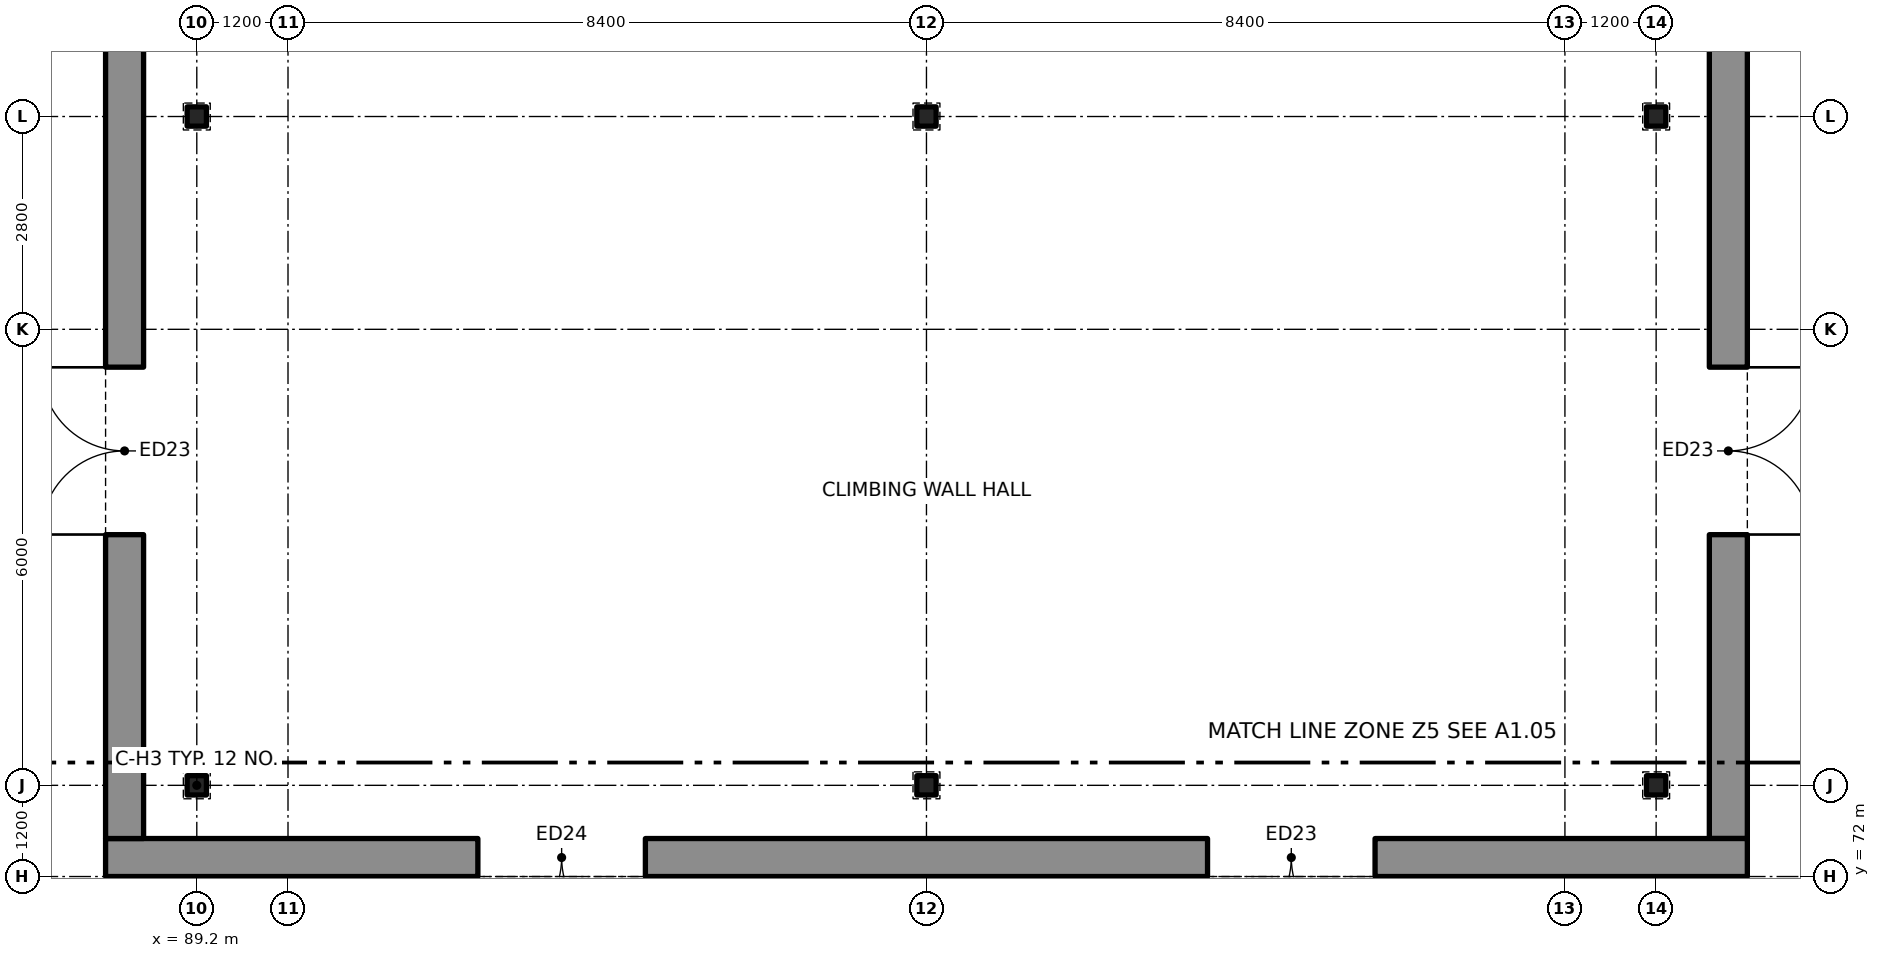
"""IFC4 building model, lengths in metres.
Left out: names, types, materials, properties, quantities, classifications, styles, units other than length and angle.
Written with IfcOpenShell. Run it as: python <this file> out.ifc"""

import sys

from ifc_helpers import new_model, si_unit, direction, frame, frame_2d, origin, origin_2d, place, context, subcontext, project, spatial, rectangle, hollow_rectangle, extrude, element, fill, save


model = new_model("IFC4")
c1 = context("Model", 3, precision=1e-05, world=origin(), true_north=direction((0.0, 1.0)))
c2 = subcontext(c1, "Body", "Model", "MODEL_VIEW")
j1 = project(units=[si_unit("LENGTHUNIT", "METRE"), si_unit("PLANEANGLEUNIT", "RADIAN")], contexts=[c1])
p1 = place(None, origin())
s1 = spatial("IfcSite", under=j1, at=p1, CompositionType="ELEMENT")
p2 = place(p1, origin())
s2 = spatial("IfcBuilding", under=s1, at=p2, CompositionType="ELEMENT")
p3 = place(p2, origin())
s3 = spatial("IfcBuildingStorey", under=s2, at=p3, CompositionType="ELEMENT", Elevation=0.0)
for number, where, z_axis, x_axis in (
    (1, (89.2, 73.2, -0.5), (0.0, 0.0, 1.0), (1.0, 0.0, 0.0)),
    (2, (89.2, 82.0, -0.5), (0.0, 0.0, 1.0), (1.0, 0.0, 0.0)),
    (3, (98.8, 73.2, -0.5), (0.0, 0.0, 1.0), (1.0, 0.0, 0.0)),
    (4, (98.8, 82.0, -0.5), (0.0, 0.0, 1.0), (1.0, 0.0, 0.0)),
    (5, (108.4, 73.2, -0.5), (0.0, 0.0, 1.0), (1.0, 0.0, 0.0)),
    (6, (108.4, 82.0, -0.5), (0.0, 0.0, 1.0), (1.0, 0.0, 0.0)),
):
    element("IfcColumn", number, at=place(p3, frame(where, z_axis=z_axis, x_axis=x_axis)), inside=s3, PredefinedType="COLUMN", context=c2, shape_type="SweptSolid", body=[
        extrude(hollow_rectangle(XDim=0.254, YDim=0.254, WallThickness=0.013, at=origin_2d()), origin(), (0.0, 0.0, 1.0), 4.9),
    ])
p4 = place(p3, frame((88.25, 72.5, 0.0), z_axis=(0.0, 0.0, 1.0), x_axis=(0.0, 1.0, 0.0)))
e7 = element("IfcWall", 7, at=p4, inside=s3, PredefinedType="SOLIDWALL", context=c2, shape_type="SweptSolid", body=[
    extrude(rectangle(XDim=27.95, YDim=0.5, at=frame_2d((13.975, 0.0))), origin(), (0.0, 0.0, 1.0), 4.4),
])
p5 = place(p4, frame((4.0, 0.0, 0.0)))
e8 = element("IfcOpeningElement", 8, at=p5, cuts=e7, PredefinedType="OPENING", context=c2, shape_type="SweptSolid", body=[
    extrude(rectangle(XDim=2.2, YDim=2.4, at=frame_2d((1.1, 1.2))), frame((0.0, 0.26, 0.0), z_axis=(0.0, -1.0, 0.0), x_axis=(1.0, 0.0, 0.0)), (0.0, 0.0, 1.0), 0.52),
])
p6 = place(p4, frame((23.9, 0.0, 0.0)))
e9 = element("IfcOpeningElement", 9, at=p6, cuts=e7, PredefinedType="OPENING", context=c2, shape_type="SweptSolid", body=[
    extrude(rectangle(XDim=1.2, YDim=2.4, at=frame_2d((0.6, 1.2))), frame((0.0, 0.26, 0.0), z_axis=(0.0, -1.0, 0.0), x_axis=(1.0, 0.0, 0.0)), (0.0, 0.0, 1.0), 0.52),
])
p7 = place(p3, frame((109.35, 72.5, 0.0), z_axis=(0.0, 0.0, 1.0), x_axis=(0.0, 1.0, 0.0)))
e10 = element("IfcWall", 10, at=p7, inside=s3, PredefinedType="SOLIDWALL", context=c2, shape_type="SweptSolid", body=[
    extrude(rectangle(XDim=27.95, YDim=0.5, at=frame_2d((13.975, 0.0))), origin(), (0.0, 0.0, 1.0), 4.4),
])
p8 = place(p7, frame((4.0, 0.0, 0.0)))
e11 = element("IfcOpeningElement", 11, at=p8, cuts=e10, PredefinedType="OPENING", context=c2, shape_type="SweptSolid", body=[
    extrude(rectangle(XDim=2.2, YDim=2.4, at=frame_2d((1.1, 1.2))), frame((0.0, 0.26, 0.0), z_axis=(0.0, -1.0, 0.0), x_axis=(1.0, 0.0, 0.0)), (0.0, 0.0, 1.0), 0.52),
])
p9 = place(p7, frame((23.9, 0.0, 0.0)))
e12 = element("IfcOpeningElement", 12, at=p9, cuts=e10, PredefinedType="OPENING", context=c2, shape_type="SweptSolid", body=[
    extrude(rectangle(XDim=1.2, YDim=2.4, at=frame_2d((0.6, 1.2))), frame((0.0, 0.26, 0.0), z_axis=(0.0, -1.0, 0.0), x_axis=(1.0, 0.0, 0.0)), (0.0, 0.0, 1.0), 0.52),
])
p10 = place(p3, frame((88.0, 72.25, 0.0), z_axis=(0.0, 0.0, 1.0), x_axis=(1.0, 0.0, 0.0)))
e13 = element("IfcWall", 13, at=p10, inside=s3, PredefinedType="SOLIDWALL", context=c2, shape_type="SweptSolid", body=[
    extrude(rectangle(XDim=21.6, YDim=0.5, at=frame_2d((10.8, 0.0))), origin(), (0.0, 0.0, 1.0), 4.4),
])
p11 = place(p10, frame((4.9, 0.0, 0.0)))
e14 = element("IfcOpeningElement", 14, at=p11, cuts=e13, PredefinedType="OPENING", context=c2, shape_type="SweptSolid", body=[
    extrude(rectangle(XDim=2.2, YDim=2.7, at=frame_2d((1.1, 1.35))), frame((0.0, 0.26, 0.0), z_axis=(0.0, -1.0, 0.0), x_axis=(1.0, 0.0, 0.0)), (0.0, 0.0, 1.0), 0.52),
])
p12 = place(p10, frame((14.5, 0.0, 0.0)))
e15 = element("IfcOpeningElement", 15, at=p12, cuts=e13, PredefinedType="OPENING", context=c2, shape_type="SweptSolid", body=[
    extrude(rectangle(XDim=2.2, YDim=2.4, at=frame_2d((1.1, 1.2))), frame((0.0, 0.26, 0.0), z_axis=(0.0, -1.0, 0.0), x_axis=(1.0, 0.0, 0.0)), (0.0, 0.0, 1.0), 0.52),
])
p13 = place(p5, origin())
e16 = element("IfcDoor", 16, at=p13, inside=s3, OperationType="DOUBLE_DOOR_SINGLE_SWING", PredefinedType="DOOR", context=c2, shape_type="SweptSolid", body=[
    extrude(rectangle(XDim=2.2, YDim=2.4, at=frame_2d((1.1, 1.2))), frame((0.0, 0.025, 0.0), z_axis=(0.0, -1.0, 0.0), x_axis=(1.0, 0.0, 0.0)), (0.0, 0.0, 1.0), 0.05),
])
fill(e8, e16)
p14 = place(p8, origin())
e17 = element("IfcDoor", 17, at=p14, inside=s3, OperationType="DOUBLE_DOOR_SINGLE_SWING", PredefinedType="DOOR", context=c2, shape_type="SweptSolid", body=[
    extrude(rectangle(XDim=2.2, YDim=2.4, at=frame_2d((1.1, 1.2))), frame((0.0, 0.025, 0.0), z_axis=(0.0, -1.0, 0.0), x_axis=(1.0, 0.0, 0.0)), (0.0, 0.0, 1.0), 0.05),
])
fill(e11, e17)
p15 = place(p11, origin())
e18 = element("IfcDoor", 18, at=p15, inside=s3, OperationType="DOUBLE_DOOR_SINGLE_SWING", PredefinedType="DOOR", context=c2, shape_type="SweptSolid", body=[
    extrude(rectangle(XDim=2.2, YDim=2.7, at=frame_2d((1.1, 1.35))), frame((0.0, 0.025, 0.0), z_axis=(0.0, -1.0, 0.0), x_axis=(1.0, 0.0, 0.0)), (0.0, 0.0, 1.0), 0.05),
])
fill(e14, e18)
p16 = place(p12, origin())
e19 = element("IfcDoor", 19, at=p16, inside=s3, OperationType="DOUBLE_DOOR_SINGLE_SWING", PredefinedType="DOOR", context=c2, shape_type="SweptSolid", body=[
    extrude(rectangle(XDim=2.2, YDim=2.4, at=frame_2d((1.1, 1.2))), frame((0.0, 0.025, 0.0), z_axis=(0.0, -1.0, 0.0), x_axis=(1.0, 0.0, 0.0)), (0.0, 0.0, 1.0), 0.05),
])
fill(e15, e19)
save(model, sys.argv[1])
